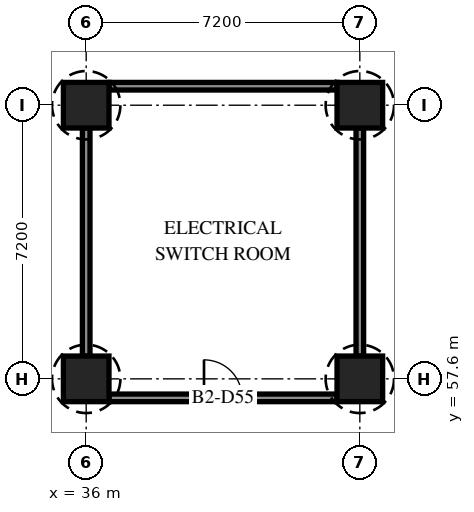
"""IFC4 building model, lengths in metres.
Left out: names, types, materials, properties, quantities, classifications, styles, units other than length and angle.
Written with IfcOpenShell. Run it as: python <this file> out.ifc"""

import sys

from ifc_helpers import new_model, si_unit, direction, frame, frame_2d, origin, origin_2d, place, context, subcontext, project, spatial, rectangle, extrude, element, fill, save


model = new_model("IFC4")
c1 = context("Model", 3, precision=1e-05, world=origin(), true_north=direction((0.0, 1.0)))
c2 = subcontext(c1, "Body", "Model", "MODEL_VIEW")
j1 = project(units=[si_unit("LENGTHUNIT", "METRE"), si_unit("PLANEANGLEUNIT", "RADIAN")], contexts=[c1])
p1 = place(None, origin())
s1 = spatial("IfcSite", under=j1, at=p1, CompositionType="ELEMENT")
p2 = place(p1, origin())
s2 = spatial("IfcBuilding", under=s1, at=p2, CompositionType="ELEMENT")
p3 = place(p2, frame((0.0, 0.0, -9.0)))
s3 = spatial("IfcBuildingStorey", under=s2, at=p3, CompositionType="ELEMENT", Elevation=-9.0)
for number, where, z_axis, x_axis in (
    (1, (36.0, 57.6, 0.0), (0.0, 0.0, 1.0), (1.0, 0.0, 0.0)),
    (2, (36.0, 64.8, 0.0), (0.0, 0.0, 1.0), (1.0, 0.0, 0.0)),
    (3, (43.2, 57.6, 0.0), (0.0, 0.0, 1.0), (1.0, 0.0, 0.0)),
    (4, (43.2, 64.8, 0.0), (0.0, 0.0, 1.0), (1.0, 0.0, 0.0)),
):
    element("IfcColumn", number, at=place(p3, frame(where, z_axis=z_axis, x_axis=x_axis)), inside=s3, PredefinedType="COLUMN", context=c2, shape_type="SweptSolid", body=[
        extrude(rectangle(XDim=1.2, YDim=1.2, at=origin_2d()), origin(), (0.0, 0.0, 1.0), 4.2),
    ])
for number, where, z_axis, x_axis in (
    (5, (36.0, 58.2, 0.0), (0.0, 0.0, 1.0), (0.0, 1.0, 0.0)),
    (6, (43.2, 58.2, 0.0), (0.0, 0.0, 1.0), (0.0, 1.0, 0.0)),
):
    element("IfcWall", number, at=place(p3, frame(where, z_axis=z_axis, x_axis=x_axis)), inside=s3, PredefinedType="PARTITIONING", context=c2, shape_type="SweptSolid", body=[
        extrude(rectangle(XDim=6.0, YDim=0.2, at=frame_2d((3.0, 0.0))), origin(), (0.0, 0.0, 1.0), 4.2),
    ])
p4 = place(p3, frame((36.6, 57.1, 0.0), z_axis=(0.0, 0.0, 1.0), x_axis=(1.0, 0.0, 0.0)))
e7 = element("IfcWall", 7, at=p4, inside=s3, PredefinedType="PARTITIONING", context=c2, shape_type="SweptSolid", body=[
    extrude(rectangle(XDim=6.0, YDim=0.2, at=frame_2d((3.0, 0.0))), origin(), (0.0, 0.0, 1.0), 4.2),
])
p5 = place(p4, frame((2.5, 0.0, 0.0)))
e8 = element("IfcOpeningElement", 8, at=p5, cuts=e7, PredefinedType="OPENING", context=c2, shape_type="SweptSolid", body=[
    extrude(rectangle(XDim=1.0, YDim=2.1, at=frame_2d((0.5, 1.05))), frame((0.0, 0.11, 0.0), z_axis=(0.0, -1.0, 0.0), x_axis=(1.0, 0.0, 0.0)), (0.0, 0.0, 1.0), 0.22),
])
p6 = place(p3, frame((36.6, 65.3, 0.0), z_axis=(0.0, 0.0, 1.0), x_axis=(1.0, 0.0, 0.0)))
e9 = element("IfcWall", 9, at=p6, inside=s3, PredefinedType="PARTITIONING", context=c2, shape_type="SweptSolid", body=[
    extrude(rectangle(XDim=6.0, YDim=0.2, at=frame_2d((3.0, 0.0))), origin(), (0.0, 0.0, 1.0), 4.2),
])
p7 = place(p5, origin())
e10 = element("IfcDoor", 10, at=p7, inside=s3, OperationType="SINGLE_SWING_RIGHT", PredefinedType="DOOR", context=c2, shape_type="SweptSolid", body=[
    extrude(rectangle(XDim=1.0, YDim=2.1, at=frame_2d((0.5, 1.05))), frame((0.0, 0.025, 0.0), z_axis=(0.0, -1.0, 0.0), x_axis=(1.0, 0.0, 0.0)), (0.0, 0.0, 1.0), 0.05),
])
fill(e8, e10)
save(model, sys.argv[1])
